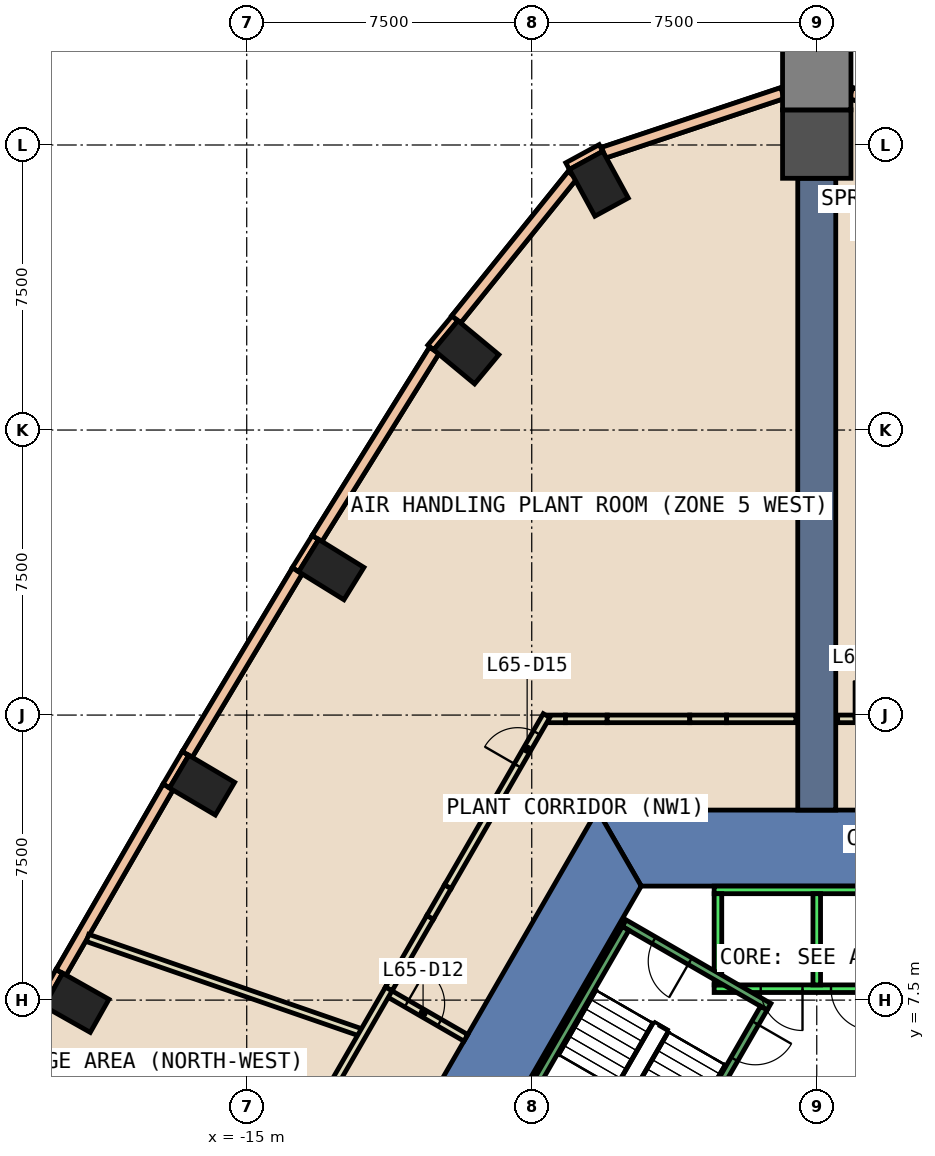
"""IFC4 building model, lengths in metres.
Left out: names, types, materials, properties, quantities, classifications, styles, units other than length and angle.
Written with IfcOpenShell. Run it as: python <this file> out.ifc"""

import sys

from ifc_helpers import new_model, si_unit, direction, frame, frame_2d, origin, origin_2d, place, context, subcontext, project, spatial, polyline, rectangle, outline, extrude, element, fill, save


model = new_model("IFC4")
c1 = context("Model", 3, precision=1e-05, world=origin(), true_north=direction((0.0, 1.0)))
c2 = subcontext(c1, "Body", "Model", "MODEL_VIEW")
j1 = project(units=[si_unit("LENGTHUNIT", "METRE"), si_unit("PLANEANGLEUNIT", "RADIAN")], contexts=[c1])
p1 = place(None, origin())
s1 = spatial("IfcSite", under=j1, at=p1, CompositionType="ELEMENT")
p2 = place(p1, origin())
s2 = spatial("IfcBuilding", under=s1, at=p2, CompositionType="ELEMENT")
p3 = place(p2, frame((0.0, 0.0, 281.0)))
s3 = spatial("IfcBuildingStorey", under=s2, at=p3, CompositionType="ELEMENT", Elevation=281.0)
p4 = place(p3, frame((0.0, 30.024, -0.6), z_axis=(0.0, 0.0, 1.0), x_axis=(0.0, 1.0, 0.0)))
e1 = element("IfcColumn", 1, at=p4, inside=s3, PredefinedType="COLUMN", context=c2, shape_type="SweptSolid", body=[
    extrude(rectangle(XDim=1.8, YDim=1.8, at=origin_2d()), origin(), (0.0, 0.0, 1.0), 5.4),
])
for number, where, z_axis, x_axis in (
    (2, (-5.734, 28.981, -0.6), (0.0, 0.0, 1.0), (0.878, 0.478, 0.0)),
    (3, (-9.223, 24.546, -0.6), (0.0, 0.0, 1.0), (0.639, 0.769, 0.0)),
    (4, (-12.774, 18.828, -0.6), (0.0, 0.0, 1.0), (0.526, 0.851, 0.0)),
    (5, (-16.175, 13.156, -0.6), (0.0, 0.0, 1.0), (0.509, 0.861, 0.0)),
    (6, (-19.481, 7.43, -0.6), (0.0, 0.0, 1.0), (0.491, 0.871, 0.0)),
):
    element("IfcColumn", number, at=place(p3, frame(where, z_axis=z_axis, x_axis=x_axis)), inside=s3, PredefinedType="COLUMN", context=c2, shape_type="SweptSolid", body=[
        extrude(rectangle(XDim=1.0, YDim=1.4, at=origin_2d()), origin(), (0.0, 0.0, 1.0), 5.4),
    ])
p5 = place(p3, frame((0.0, 31.824, -0.6), z_axis=(0.0, 0.0, 1.0), x_axis=(0.0, 1.0, 0.0)))
e7 = element("IfcColumn", 7, at=p5, inside=s3, PredefinedType="COLUMN", context=c2, shape_type="SweptSolid", body=[
    extrude(rectangle(XDim=1.8, YDim=1.8, at=origin_2d()), origin(), (0.0, 0.0, 1.0), 5.4),
])
p6 = place(p3, frame((0.0, 0.0, -0.6)))
e8 = element("IfcWall", 8, at=p6, inside=s3, PredefinedType="SHEAR", context=c2, shape_type="SweptSolid", body=[
    extrude(outline(polyline([(5.774, 12.5), (-5.774, 12.5), (-4.619, 10.5), (4.619, 10.5), (5.774, 12.5)])), origin(), (0.0, 0.0, 1.0), 5.4),
])
p7 = place(p3, frame((0.0, 0.0, -0.6)))
e9 = element("IfcWall", 9, at=p7, inside=s3, PredefinedType="SHEAR", context=c2, shape_type="SweptSolid", body=[
    extrude(outline(polyline([(-10.535, 4.253), (-8.803, 3.253), (-4.619, 10.5), (-5.774, 12.5), (-10.535, 4.253)])), origin(), (0.0, 0.0, 1.0), 5.4),
])
p8 = place(p3, frame((0.0, 12.5, 0.0), z_axis=(0.0, 0.0, 1.0), x_axis=(0.0, 1.0, 0.0)))
e10 = element("IfcWall", 10, at=p8, inside=s3, PredefinedType="SHEAR", context=c2, shape_type="SweptSolid", body=[
    extrude(rectangle(XDim=16.624, YDim=1.0, at=frame_2d((8.312, 0.0))), origin(), (0.0, 0.0, 1.0), 4.8),
])
for number, where, z_axis, x_axis in (
    (11, (-5.678, 29.922, 0.0), (0.0, 0.0, 1.0), (-0.878, -0.478, 0.0)),
    (12, (-9.519, 25.442, 0.0), (0.0, 0.0, 1.0), (-0.638, -0.77, 0.0)),
):
    element("IfcWall", number, at=place(p3, frame(where, z_axis=z_axis, x_axis=x_axis)), inside=s3, PredefinedType="STANDARD", context=c2, shape_type="SweptSolid", body=[
        extrude(rectangle(XDim=1.0, YDim=0.2, at=frame_2d((0.5, 0.0))), origin(), (0.0, 0.0, 1.0), 4.8),
    ])
p9 = place(p3, frame((-13.192, 19.674, 0.0), z_axis=(0.0, 0.0, 1.0), x_axis=(-0.525825307325, -0.850592585306, 0.0)))
e13 = element("IfcWall", 13, at=p9, inside=s3, PredefinedType="STANDARD", context=c2, shape_type="SweptSolid", body=[
    extrude(rectangle(XDim=1.0, YDim=0.2, at=frame_2d((0.5, 0.0))), origin(), (0.0, 0.0, 1.0), 4.8),
])
p10 = place(p3, frame((-16.61, 13.994, 0.0), z_axis=(0.0, 0.0, 1.0), x_axis=(-0.508087253435, -0.86130560366, 0.0)))
e14 = element("IfcWall", 14, at=p10, inside=s3, PredefinedType="STANDARD", context=c2, shape_type="SweptSolid", body=[
    extrude(rectangle(XDim=1.0, YDim=0.2, at=frame_2d((0.5, 0.0))), origin(), (0.0, 0.0, 1.0), 4.8),
])
p11 = place(p3, frame((-19.932, 8.258, 0.0), z_axis=(0.0, 0.0, 1.0), x_axis=(-0.491928603027, -0.870635543453, 0.0)))
e15 = element("IfcWall", 15, at=p11, inside=s3, PredefinedType="STANDARD", context=c2, shape_type="SweptSolid", body=[
    extrude(rectangle(XDim=1.0, YDim=0.2, at=frame_2d((0.5, 0.0))), origin(), (0.0, 0.0, 1.0), 4.8),
])
p12 = place(p3, frame((5.611, 29.797, 0.0), z_axis=(0.0, 0.0, 1.0), x_axis=(-0.948737354495, 0.316065550459, 0.0)))
e16 = element("IfcWall", 16, at=p12, inside=s3, PredefinedType="STANDARD", context=c2, shape_type="SweptSolid", body=[
    extrude(rectangle(XDim=4.967, YDim=0.3, at=frame_2d((2.483, 0.0))), origin(), (0.0, 0.0, 1.0), 1.2),
])
p13 = place(p3, frame((5.611, 29.797, 4.0), z_axis=(0.0, 0.0, 1.0), x_axis=(-0.948737354495, 0.316065550459, 0.0)))
e17 = element("IfcWall", 17, at=p13, inside=s3, PredefinedType="STANDARD", context=c2, shape_type="SweptSolid", body=[
    extrude(rectangle(XDim=4.967, YDim=0.3, at=frame_2d((2.483, 0.0))), origin(), (0.0, 0.0, 1.0), 0.8),
])
p14 = place(p3, frame((-0.899, 31.367, 0.0), z_axis=(0.0, 0.0, 1.0), x_axis=(-0.948737354495, -0.316065550459, 0.0)))
e18 = element("IfcWall", 18, at=p14, inside=s3, PredefinedType="STANDARD", context=c2, shape_type="SweptSolid", body=[
    extrude(rectangle(XDim=4.967, YDim=0.3, at=frame_2d((2.483, 0.0))), origin(), (0.0, 0.0, 1.0), 1.2),
])
p15 = place(p3, frame((-0.899, 31.367, 4.0), z_axis=(0.0, 0.0, 1.0), x_axis=(-0.948737354495, -0.316065550459, 0.0)))
e19 = element("IfcWall", 19, at=p15, inside=s3, PredefinedType="STANDARD", context=c2, shape_type="SweptSolid", body=[
    extrude(rectangle(XDim=4.967, YDim=0.3, at=frame_2d((2.483, 0.0))), origin(), (0.0, 0.0, 1.0), 0.8),
])
p16 = place(p3, frame((-6.427, 29.208, 0.0), z_axis=(0.0, 0.0, 1.0), x_axis=(-0.627683908381, -0.778468310954, 0.0)))
e20 = element("IfcWall", 20, at=p16, inside=s3, PredefinedType="STANDARD", context=c2, shape_type="SweptSolid", body=[
    extrude(rectangle(XDim=4.874, YDim=0.3, at=frame_2d((2.437, 0.0))), origin(), (0.0, 0.0, 1.0), 1.2),
])
p17 = place(p3, frame((-6.427, 29.208, 4.0), z_axis=(0.0, 0.0, 1.0), x_axis=(-0.627683908381, -0.778468310954, 0.0)))
e21 = element("IfcWall", 21, at=p17, inside=s3, PredefinedType="STANDARD", context=c2, shape_type="SweptSolid", body=[
    extrude(rectangle(XDim=4.874, YDim=0.3, at=frame_2d((2.437, 0.0))), origin(), (0.0, 0.0, 1.0), 0.8),
])
p18 = place(p3, frame((-10.065, 24.597, 0.0), z_axis=(0.0, 0.0, 1.0), x_axis=(-0.528722913279, -0.848794486889, 0.0)))
e22 = element("IfcWall", 22, at=p18, inside=s3, PredefinedType="STANDARD", context=c2, shape_type="SweptSolid", body=[
    extrude(rectangle(XDim=5.833, YDim=0.3, at=frame_2d((2.917, 0.0))), origin(), (0.0, 0.0, 1.0), 1.2),
])
p19 = place(p3, frame((-10.065, 24.597, 4.0), z_axis=(0.0, 0.0, 1.0), x_axis=(-0.528722913279, -0.848794486889, 0.0)))
e23 = element("IfcWall", 23, at=p19, inside=s3, PredefinedType="STANDARD", context=c2, shape_type="SweptSolid", body=[
    extrude(rectangle(XDim=5.833, YDim=0.3, at=frame_2d((2.917, 0.0))), origin(), (0.0, 0.0, 1.0), 0.8),
])
p20 = place(p3, frame((-13.669, 18.794, 0.0), z_axis=(0.0, 0.0, 1.0), x_axis=(-0.514272513936, -0.857626831092, 0.0)))
e24 = element("IfcWall", 24, at=p20, inside=s3, PredefinedType="STANDARD", context=c2, shape_type="SweptSolid", body=[
    extrude(rectangle(XDim=5.629, YDim=0.3, at=frame_2d((2.815, 0.0))), origin(), (0.0, 0.0, 1.0), 1.2),
])
p21 = place(p3, frame((-13.669, 18.794, 4.0), z_axis=(0.0, 0.0, 1.0), x_axis=(-0.514272513936, -0.857626831092, 0.0)))
e25 = element("IfcWall", 25, at=p21, inside=s3, PredefinedType="STANDARD", context=c2, shape_type="SweptSolid", body=[
    extrude(rectangle(XDim=5.629, YDim=0.3, at=frame_2d((2.815, 0.0))), origin(), (0.0, 0.0, 1.0), 0.8),
])
p22 = place(p3, frame((-17.07, 13.106, 0.0), z_axis=(0.0, 0.0, 1.0), x_axis=(-0.49997269499, -0.866041167766, 0.0)))
e26 = element("IfcWall", 26, at=p22, inside=s3, PredefinedType="STANDARD", context=c2, shape_type="SweptSolid", body=[
    extrude(rectangle(XDim=5.63, YDim=0.3, at=frame_2d((2.815, 0.0))), origin(), (0.0, 0.0, 1.0), 1.2),
])
p23 = place(p3, frame((-17.07, 13.106, 4.0), z_axis=(0.0, 0.0, 1.0), x_axis=(-0.49997269499, -0.866041167766, 0.0)))
e27 = element("IfcWall", 27, at=p23, inside=s3, PredefinedType="STANDARD", context=c2, shape_type="SweptSolid", body=[
    extrude(rectangle(XDim=5.63, YDim=0.3, at=frame_2d((2.815, 0.0))), origin(), (0.0, 0.0, 1.0), 0.8),
])
p24 = place(p3, frame((0.55, 14.9, 0.0), z_axis=(0.0, 0.0, 1.0), x_axis=(1.0, 0.0, 0.0)))
e28 = element("IfcWall", 28, at=p24, inside=s3, PredefinedType="PARTITIONING", context=c2, shape_type="SweptSolid", body=[
    extrude(rectangle(XDim=1.657, YDim=0.2, at=frame_2d((0.829, 0.0))), origin(), (0.0, 0.0, 1.0), 4.8),
])
p25 = place(p24, frame((0.427, 0.0, 0.0)))
e29 = element("IfcOpeningElement", 29, at=p25, cuts=e28, PredefinedType="OPENING", context=c2, shape_type="SweptSolid", body=[
    extrude(rectangle(XDim=1.0, YDim=2.1, at=frame_2d((0.5, 1.05))), frame((0.0, 0.11, 0.0), z_axis=(0.0, -1.0, 0.0), x_axis=(1.0, 0.0, 0.0)), (0.0, 0.0, 1.0), 0.22),
])
p26 = place(p3, frame((0.0, 30.944, 0.0), z_axis=(0.0, 0.0, 1.0), x_axis=(0.0, 1.0, 0.0)))
e30 = element("IfcWall", 30, at=p26, inside=s3, PredefinedType="PARTITIONING", context=c2, shape_type="SweptSolid", body=[
    extrude(rectangle(XDim=0.501, YDim=0.2, at=frame_2d((0.25, 0.0))), origin(), (0.0, 0.0, 1.0), 4.8),
])
p27 = place(p3, frame((-11.312, 7.707, 0.0), z_axis=(0.0, 0.0, 1.0), x_axis=(0.865999212041, -0.500045362686, 0.0)))
e31 = element("IfcWall", 31, at=p27, inside=s3, PredefinedType="PARTITIONING", context=c2, shape_type="SweptSolid", body=[
    extrude(rectangle(XDim=2.4, YDim=0.2, at=frame_2d((1.2, 0.0))), origin(), (0.0, 0.0, 1.0), 4.8),
])
p28 = place(p27, frame((0.6, 0.0, 0.0)))
e32 = element("IfcOpeningElement", 32, at=p28, cuts=e31, PredefinedType="OPENING", context=c2, shape_type="SweptSolid", body=[
    extrude(rectangle(XDim=1.0, YDim=2.1, at=frame_2d((0.5, 1.05))), frame((0.0, 0.11, 0.0), z_axis=(0.0, -1.0, 0.0), x_axis=(1.0, 0.0, 0.0)), (0.0, 0.0, 1.0), 0.22),
])
p29 = place(p3, frame((-11.262, 7.794, 0.0), z_axis=(0.0, 0.0, 1.0), x_axis=(0.500049485622, 0.865996831362, 0.0)))
e33 = element("IfcWall", 33, at=p29, inside=s3, PredefinedType="PARTITIONING", context=c2, shape_type="SweptSolid", body=[
    extrude(rectangle(XDim=2.176, YDim=0.2, at=frame_2d((1.088, 0.0))), origin(), (0.0, 0.0, 1.0), 4.8),
])
p30 = place(p3, frame((-7.06, 14.9, 0.0), z_axis=(0.0, 0.0, 1.0), x_axis=(1.0, 0.0, 0.0)))
e34 = element("IfcWall", 34, at=p30, inside=s3, PredefinedType="PARTITIONING", context=c2, shape_type="SweptSolid", body=[
    extrude(rectangle(XDim=0.446, YDim=0.2, at=frame_2d((0.223, 0.0))), origin(), (0.0, 0.0, 1.0), 4.8),
])
p31 = place(p3, frame((-19.189, 9.136, 0.0), z_axis=(0.0, 0.0, 1.0), x_axis=(0.94508965871, -0.326811164129, 0.0)))
e35 = element("IfcWall", 35, at=p31, inside=s3, PredefinedType="PARTITIONING", context=c2, shape_type="SweptSolid", body=[
    extrude(rectangle(XDim=7.674, YDim=0.2, at=frame_2d((3.837, 0.0))), origin(), (0.0, 0.0, 1.0), 4.8),
])
p32 = place(p3, frame((-13.025, 4.74, 0.0), z_axis=(0.0, 0.0, 1.0), x_axis=(0.499944203502, 0.866057615511, 0.0)))
e36 = element("IfcWall", 36, at=p32, inside=s3, PredefinedType="PARTITIONING", context=c2, shape_type="SweptSolid", body=[
    extrude(rectangle(XDim=3.526, YDim=0.2, at=frame_2d((1.763, 0.0))), origin(), (0.0, 0.0, 1.0), 4.8),
])
p33 = place(p3, frame((-10.174, 9.678, 0.0), z_axis=(0.0, 0.0, 1.0), x_axis=(0.49960161538, 0.866255289109, 0.0)))
e37 = element("IfcWall", 37, at=p33, inside=s3, PredefinedType="PARTITIONING", context=c2, shape_type="SweptSolid", body=[
    extrude(rectangle(XDim=0.933, YDim=0.2, at=frame_2d((0.466, 0.0))), origin(), (0.0, 0.0, 1.0), 2.4),
])
p34 = place(p3, frame((-9.708, 10.486, 0.0), z_axis=(0.0, 0.0, 1.0), x_axis=(0.499893254026, 0.86608702483, 0.0)))
e38 = element("IfcWall", 38, at=p34, inside=s3, PredefinedType="PARTITIONING", context=c2, shape_type="SweptSolid", body=[
    extrude(rectangle(XDim=5.197, YDim=0.2, at=frame_2d((2.599, 0.0))), origin(), (0.0, 0.0, 1.0), 4.8),
])
p35 = place(p34, frame((3.675, 0.0, 0.0)))
e39 = element("IfcOpeningElement", 39, at=p35, cuts=e38, PredefinedType="OPENING", context=c2, shape_type="SweptSolid", body=[
    extrude(rectangle(XDim=1.0, YDim=2.1, at=frame_2d((0.5, 1.05))), frame((0.0, 0.11, 0.0), z_axis=(0.0, -1.0, 0.0), x_axis=(1.0, 0.0, 0.0)), (0.0, 0.0, 1.0), 0.22),
])
p36 = place(p3, frame((-6.614, 14.9, 0.0), z_axis=(0.0, 0.0, 1.0), x_axis=(1.0, 0.0, 0.0)))
e40 = element("IfcWall", 40, at=p36, inside=s3, PredefinedType="PARTITIONING", context=c2, shape_type="SweptSolid", body=[
    extrude(rectangle(XDim=1.099, YDim=0.2, at=frame_2d((0.55, 0.0))), origin(), (0.0, 0.0, 1.0), 2.4),
])
p37 = place(p3, frame((-5.515, 14.9, 0.0), z_axis=(0.0, 0.0, 1.0), x_axis=(1.0, 0.0, 0.0)))
e41 = element("IfcWall", 41, at=p37, inside=s3, PredefinedType="PARTITIONING", context=c2, shape_type="SweptSolid", body=[
    extrude(rectangle(XDim=2.173, YDim=0.2, at=frame_2d((1.086, 0.0))), origin(), (0.0, 0.0, 1.0), 4.8),
])
p38 = place(p3, frame((-3.342, 14.9, 0.0), z_axis=(0.0, 0.0, 1.0), x_axis=(1.0, 0.0, 0.0)))
e42 = element("IfcWall", 42, at=p38, inside=s3, PredefinedType="PARTITIONING", context=c2, shape_type="SweptSolid", body=[
    extrude(rectangle(XDim=0.969, YDim=0.2, at=frame_2d((0.484, 0.0))), origin(), (0.0, 0.0, 1.0), 2.4),
])
p39 = place(p3, frame((-2.373, 14.9, 0.0), z_axis=(0.0, 0.0, 1.0), x_axis=(1.0, 0.0, 0.0)))
e43 = element("IfcWall", 43, at=p39, inside=s3, PredefinedType="PARTITIONING", context=c2, shape_type="SweptSolid", body=[
    extrude(rectangle(XDim=1.823, YDim=0.2, at=frame_2d((0.912, 0.0))), origin(), (0.0, 0.0, 1.0), 4.8),
])
p40 = place(p3, frame((2.7, 7.8, 0.0), z_axis=(0.0, 0.0, 1.0), x_axis=(-1.0, 0.0, 0.0)))
e44 = element("IfcWall", 44, at=p40, inside=s3, PredefinedType="STANDARD", context=c2, shape_type="SweptSolid", body=[
    extrude(rectangle(XDim=5.4, YDim=0.2, at=frame_2d((2.7, 0.0))), origin(), (0.0, 0.0, 1.0), 4.8),
])
p41 = place(p40, frame((1.225, 0.0, 0.0)))
e45 = element("IfcOpeningElement", 45, at=p41, cuts=e44, PredefinedType="OPENING", context=c2, shape_type="SweptSolid", body=[
    extrude(rectangle(XDim=1.1, YDim=2.1, at=frame_2d((0.55, 1.05))), frame((0.0, 0.11, 0.0), z_axis=(0.0, -1.0, 0.0), x_axis=(1.0, 0.0, 0.0)), (0.0, 0.0, 1.0), 0.22),
])
p42 = place(p40, frame((3.075, 0.0, 0.0)))
e46 = element("IfcOpeningElement", 46, at=p42, cuts=e44, PredefinedType="OPENING", context=c2, shape_type="SweptSolid", body=[
    extrude(rectangle(XDim=1.1, YDim=2.1, at=frame_2d((0.55, 1.05))), frame((0.0, 0.11, 0.0), z_axis=(0.0, -1.0, 0.0), x_axis=(1.0, 0.0, 0.0)), (0.0, 0.0, 1.0), 0.22),
])
p43 = place(p3, frame((2.7, 10.4, 0.0), z_axis=(0.0, 0.0, 1.0), x_axis=(-1.0, 0.0, 0.0)))
e47 = element("IfcWall", 47, at=p43, inside=s3, PredefinedType="STANDARD", context=c2, shape_type="SweptSolid", body=[
    extrude(rectangle(XDim=5.4, YDim=0.2, at=frame_2d((2.7, 0.0))), origin(), (0.0, 0.0, 1.0), 4.8),
])
for number, where, z_axis, x_axis in (
    (48, (0.0, 7.9, 0.0), (0.0, 0.0, 1.0), (0.0, 1.0, 0.0)),
    (49, (-2.6, 7.9, 0.0), (0.0, 0.0, 1.0), (0.0, 1.0, 0.0)),
):
    element("IfcWall", number, at=place(p3, frame(where, z_axis=z_axis, x_axis=x_axis)), inside=s3, PredefinedType="STANDARD", context=c2, shape_type="SweptSolid", body=[
        extrude(rectangle(XDim=2.4, YDim=0.2, at=frame_2d((1.2, 0.0))), origin(), (0.0, 0.0, 1.0), 4.8),
    ])
p44 = place(p3, frame((-1.256, 7.324, 0.0), z_axis=(0.0, 0.0, 1.0), x_axis=(-0.866046073146, 0.499964197906, 0.0)))
e50 = element("IfcWall", 50, at=p44, inside=s3, PredefinedType="STANDARD", context=c2, shape_type="SweptSolid", body=[
    extrude(rectangle(XDim=4.4, YDim=0.2, at=frame_2d((2.2, 0.0))), origin(), (0.0, 0.0, 1.0), 4.8),
])
p45 = place(p44, frame((2.4, 0.0, 0.0)))
e51 = element("IfcOpeningElement", 51, at=p45, cuts=e50, PredefinedType="OPENING", context=c2, shape_type="SweptSolid", body=[
    extrude(rectangle(XDim=1.1, YDim=2.2, at=frame_2d((0.55, 1.1))), frame((0.0, 0.11, 0.0), z_axis=(0.0, -1.0, 0.0), x_axis=(1.0, 0.0, 0.0)), (0.0, 0.0, 1.0), 0.22),
])
p46 = place(p3, frame((-1.393, 7.288, 0.0), z_axis=(0.0, 0.0, 1.0), x_axis=(-0.499963383562, -0.866046543262, 0.0)))
e52 = element("IfcWall", 52, at=p46, inside=s3, PredefinedType="STANDARD", context=c2, shape_type="SweptSolid", body=[
    extrude(rectangle(XDim=6.9, YDim=0.2, at=frame_2d((3.45, 0.0))), origin(), (0.0, 0.0, 1.0), 4.8),
])
p47 = place(p46, frame((0.45, 0.0, 0.0)))
e53 = element("IfcOpeningElement", 53, at=p47, cuts=e52, PredefinedType="OPENING", context=c2, shape_type="SweptSolid", body=[
    extrude(rectangle(XDim=1.1, YDim=2.2, at=frame_2d((0.55, 1.1))), frame((0.0, 0.11, 0.0), z_axis=(0.0, -1.0, 0.0), x_axis=(1.0, 0.0, 0.0)), (0.0, 0.0, 1.0), 0.22),
])
p48 = place(p3, frame((-5.03, 9.388, 0.0), z_axis=(0.0, 0.0, 1.0), x_axis=(-0.499978703459, -0.866037698999, 0.0)))
e54 = element("IfcWall", 54, at=p48, inside=s3, PredefinedType="STANDARD", context=c2, shape_type="SweptSolid", body=[
    extrude(rectangle(XDim=6.9, YDim=0.2, at=frame_2d((3.45, 0.0))), origin(), (0.0, 0.0, 1.0), 4.8),
])
p49 = place(p25, origin())
e55 = element("IfcDoor", 55, at=p49, inside=s3, OperationType="SINGLE_SWING_RIGHT", PredefinedType="DOOR", context=c2, shape_type="SweptSolid", body=[
    extrude(rectangle(XDim=1.0, YDim=2.1, at=frame_2d((0.5, 1.05))), frame((0.0, 0.025, 0.0), z_axis=(0.0, -1.0, 0.0), x_axis=(1.0, 0.0, 0.0)), (0.0, 0.0, 1.0), 0.05),
])
fill(e29, e55)
p50 = place(p28, origin())
e56 = element("IfcDoor", 56, at=p50, inside=s3, OperationType="SINGLE_SWING_LEFT", PredefinedType="DOOR", context=c2, shape_type="SweptSolid", body=[
    extrude(rectangle(XDim=1.0, YDim=2.1, at=frame_2d((0.5, 1.05))), frame((0.0, 0.025, 0.0), z_axis=(0.0, -1.0, 0.0), x_axis=(1.0, 0.0, 0.0)), (0.0, 0.0, 1.0), 0.05),
])
fill(e32, e56)
p51 = place(p35, origin())
e57 = element("IfcDoor", 57, at=p51, inside=s3, OperationType="SINGLE_SWING_RIGHT", PredefinedType="DOOR", context=c2, shape_type="SweptSolid", body=[
    extrude(rectangle(XDim=1.0, YDim=2.1, at=frame_2d((0.5, 1.05))), frame((0.0, 0.025, 0.0), z_axis=(0.0, -1.0, 0.0), x_axis=(1.0, 0.0, 0.0)), (0.0, 0.0, 1.0), 0.05),
])
fill(e39, e57)
p52 = place(p41, origin())
e58 = element("IfcDoor", 58, at=p52, inside=s3, OperationType="SLIDING_TO_LEFT", PredefinedType="DOOR", context=c2, shape_type="SweptSolid", body=[
    extrude(rectangle(XDim=1.1, YDim=2.1, at=frame_2d((0.55, 1.05))), frame((0.0, 0.025, 0.0), z_axis=(0.0, -1.0, 0.0), x_axis=(1.0, 0.0, 0.0)), (0.0, 0.0, 1.0), 0.05),
])
fill(e45, e58)
p53 = place(p42, origin())
e59 = element("IfcDoor", 59, at=p53, inside=s3, OperationType="SLIDING_TO_LEFT", PredefinedType="DOOR", context=c2, shape_type="SweptSolid", body=[
    extrude(rectangle(XDim=1.1, YDim=2.1, at=frame_2d((0.55, 1.05))), frame((0.0, 0.025, 0.0), z_axis=(0.0, -1.0, 0.0), x_axis=(1.0, 0.0, 0.0)), (0.0, 0.0, 1.0), 0.05),
])
fill(e46, e59)
p54 = place(p47, origin())
e60 = element("IfcDoor", 60, at=p54, inside=s3, OperationType="SINGLE_SWING_LEFT", PredefinedType="DOOR", context=c2, shape_type="SweptSolid", body=[
    extrude(rectangle(XDim=1.1, YDim=2.2, at=frame_2d((0.55, 1.1))), frame((0.0, 0.025, 0.0), z_axis=(0.0, -1.0, 0.0), x_axis=(1.0, 0.0, 0.0)), (0.0, 0.0, 1.0), 0.05),
])
fill(e53, e60)
p55 = place(p45, origin())
e61 = element("IfcDoor", 61, at=p55, inside=s3, OperationType="SINGLE_SWING_LEFT", PredefinedType="DOOR", context=c2, shape_type="SweptSolid", body=[
    extrude(rectangle(XDim=1.1, YDim=2.2, at=frame_2d((0.55, 1.1))), frame((0.0, 0.025, 0.0), z_axis=(0.0, -1.0, 0.0), x_axis=(1.0, 0.0, 0.0)), (0.0, 0.0, 1.0), 0.05),
])
fill(e51, e61)
save(model, sys.argv[1])
